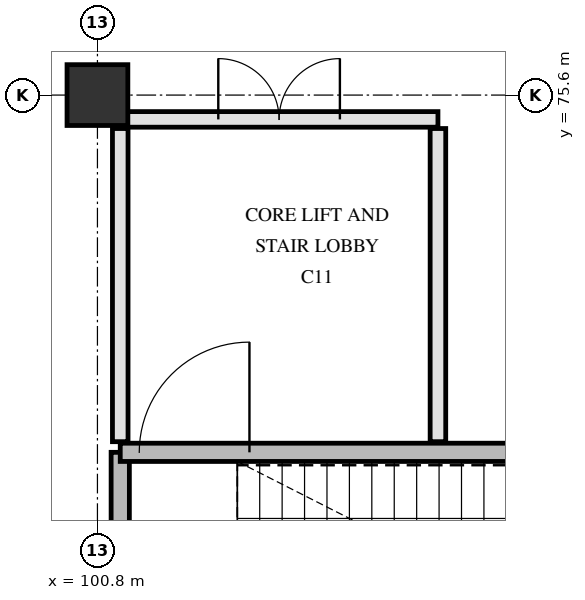
"""IFC4 building model, lengths in metres.
Left out: names, types, materials, properties, quantities, classifications, styles, units other than length and angle.
Written with IfcOpenShell. Run it as: python <this file> out.ifc"""

import sys

from ifc_helpers import new_model, si_unit, direction, frame, frame_2d, origin, origin_2d, place, context, subcontext, project, spatial, rectangle, extrude, element, fill, save


model = new_model("IFC4")
c1 = context("Model", 3, precision=1e-05, world=origin(), true_north=direction((0.0, 1.0)))
c2 = subcontext(c1, "Body", "Model", "MODEL_VIEW")
j1 = project(units=[si_unit("LENGTHUNIT", "METRE"), si_unit("PLANEANGLEUNIT", "RADIAN")], contexts=[c1])
p1 = place(None, origin())
s1 = spatial("IfcSite", under=j1, at=p1, CompositionType="ELEMENT")
p2 = place(p1, origin())
s2 = spatial("IfcBuilding", under=s1, at=p2, CompositionType="ELEMENT")
p3 = place(p2, frame((0.0, 0.0, 4.8)))
s3 = spatial("IfcBuildingStorey", under=s2, at=p3, CompositionType="ELEMENT", Elevation=4.8)
p4 = place(p3, frame((100.8, 75.6, 0.0), z_axis=(0.0, 0.0, 1.0), x_axis=(1.0, 0.0, 0.0)))
e1 = element("IfcColumn", 1, at=p4, inside=s3, PredefinedType="COLUMN", context=c2, shape_type="SweptSolid", body=[
    extrude(rectangle(XDim=0.8, YDim=0.8, at=origin_2d()), origin(), (0.0, 0.0, 1.0), 4.5),
])
p5 = place(p3, frame((101.1, 67.58, 0.0), z_axis=(0.0, 0.0, 1.0), x_axis=(0.0, 1.0, 0.0)))
e2 = element("IfcWall", 2, at=p5, inside=s3, PredefinedType="SHEAR", context=c2, shape_type="SweptSolid", body=[
    extrude(rectangle(XDim=3.32, YDim=0.24, at=frame_2d((1.66, 0.0))), origin(), (0.0, 0.0, 1.0), 4.15),
])
p6 = place(p3, frame((101.1, 70.9, 0.0), z_axis=(0.0, 0.0, 1.0), x_axis=(1.0, 0.0, 0.0)))
e3 = element("IfcWall", 3, at=p6, inside=s3, PredefinedType="SHEAR", context=c2, shape_type="SweptSolid", body=[
    extrude(rectangle(XDim=7.82, YDim=0.24, at=frame_2d((3.91, 0.0))), origin(), (0.0, 0.0, 1.0), 4.15),
])
p7 = place(p6, frame((0.25, 0.0, 0.0)))
e4 = element("IfcOpeningElement", 4, at=p7, cuts=e3, PredefinedType="OPENING", context=c2, shape_type="SweptSolid", body=[
    extrude(rectangle(XDim=1.45, YDim=2.2, at=frame_2d((0.725, 1.1))), frame((0.0, 0.13, 0.0), z_axis=(0.0, -1.0, 0.0), x_axis=(1.0, 0.0, 0.0)), (0.0, 0.0, 1.0), 0.26),
])
p8 = place(p3, frame((105.28, 71.04, 0.0), z_axis=(0.0, 0.0, 1.0), x_axis=(0.0, 1.0, 0.0)))
e5 = element("IfcWall", 5, at=p8, inside=s3, PredefinedType="PARTITIONING", context=c2, shape_type="SweptSolid", body=[
    extrude(rectangle(XDim=4.12, YDim=0.205, at=frame_2d((2.06, 0.0))), origin(), (0.0, 0.0, 1.0), 4.14),
])
p9 = place(p3, frame((101.1, 71.04, 0.0), z_axis=(0.0, 0.0, 1.0), x_axis=(0.0, 1.0, 0.0)))
e6 = element("IfcWall", 6, at=p9, inside=s3, PredefinedType="PARTITIONING", context=c2, shape_type="SweptSolid", body=[
    extrude(rectangle(XDim=4.12, YDim=0.205, at=frame_2d((2.06, 0.0))), origin(), (0.0, 0.0, 1.0), 3.59),
])
p10 = place(p3, frame((101.1, 75.28, 0.0), z_axis=(0.0, 0.0, 1.0), x_axis=(1.0, 0.0, 0.0)))
e7 = element("IfcWall", 7, at=p10, inside=s3, PredefinedType="PARTITIONING", context=c2, shape_type="SweptSolid", body=[
    extrude(rectangle(XDim=4.18, YDim=0.205, at=frame_2d((2.09, 0.0))), origin(), (0.0, 0.0, 1.0), 3.54),
])
p11 = place(p10, frame((1.29, 0.0, 0.0)))
e8 = element("IfcOpeningElement", 8, at=p11, cuts=e7, PredefinedType="OPENING", context=c2, shape_type="SweptSolid", body=[
    extrude(rectangle(XDim=1.6, YDim=2.25, at=frame_2d((0.8, 1.125))), frame((0.0, 0.113, 0.0), z_axis=(0.0, -1.0, 0.0), x_axis=(1.0, 0.0, 0.0)), (0.0, 0.0, 1.0), 0.225),
])
p12 = place(p7, origin())
e9 = element("IfcDoor", 9, at=p12, inside=s3, OperationType="SINGLE_SWING_RIGHT", PredefinedType="DOOR", context=c2, shape_type="SweptSolid", body=[
    extrude(rectangle(XDim=1.45, YDim=2.2, at=frame_2d((0.725, 1.1))), frame((0.0, 0.025, 0.0), z_axis=(0.0, -1.0, 0.0), x_axis=(1.0, 0.0, 0.0)), (0.0, 0.0, 1.0), 0.05),
])
fill(e4, e9)
p13 = place(p11, origin())
e10 = element("IfcDoor", 10, at=p13, inside=s3, OperationType="DOUBLE_SWING_LEFT", PredefinedType="DOOR", context=c2, shape_type="SweptSolid", body=[
    extrude(rectangle(XDim=1.6, YDim=2.25, at=frame_2d((0.8, 1.125))), frame((0.0, 0.025, 0.0), z_axis=(0.0, -1.0, 0.0), x_axis=(1.0, 0.0, 0.0)), (0.0, 0.0, 1.0), 0.05),
])
fill(e8, e10)
save(model, sys.argv[1])
